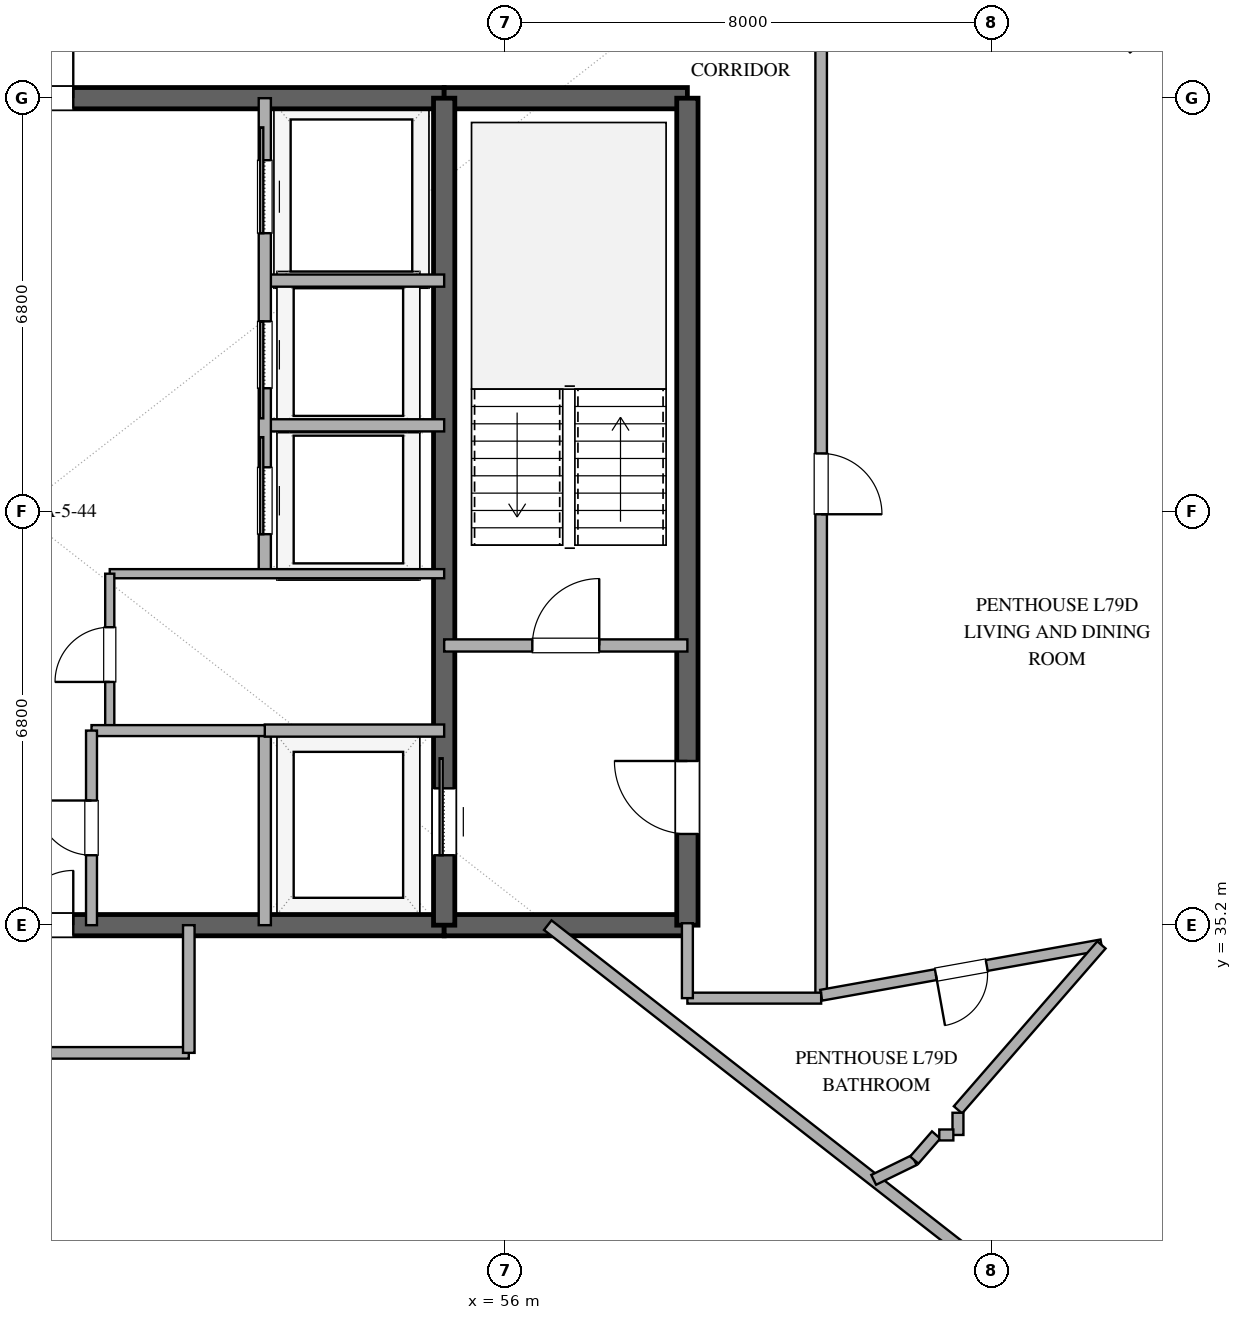
"""IFC4 building model, lengths in metres.
Left out: names, types, materials, properties, quantities, classifications, styles, units other than length and angle.
Written with IfcOpenShell. Run it as: python <this file> out.ifc"""

import sys

from ifc_helpers import new_model, si_unit, direction, frame, frame_2d, origin, place, context, subcontext, project, spatial, rectangle, extrude, element, fill, save


model = new_model("IFC4")
c1 = context("Model", 3, precision=1e-05, world=origin(), true_north=direction((0.0, 1.0)))
c2 = subcontext(c1, "Body", "Model", "MODEL_VIEW")
j1 = project(units=[si_unit("LENGTHUNIT", "METRE"), si_unit("PLANEANGLEUNIT", "RADIAN")], contexts=[c1])
p1 = place(None, origin())
s1 = spatial("IfcSite", under=j1, at=p1, CompositionType="ELEMENT")
p2 = place(p1, origin())
s2 = spatial("IfcBuilding", under=s1, at=p2, CompositionType="ELEMENT")
p3 = place(p2, frame((0.0, 0.0, 305.4)))
s3 = spatial("IfcBuildingStorey", under=s2, at=p3, CompositionType="ELEMENT", Elevation=305.4)
p4 = place(p3, frame((41.0, 35.2, 0.0), z_axis=(0.0, 0.0, 1.0), x_axis=(1.0, 0.0, 0.0)))
e1 = element("IfcWall", 1, at=p4, inside=s3, PredefinedType="SHEAR", context=c2, shape_type="SweptSolid", body=[
    extrude(rectangle(XDim=14.0, YDim=0.35, at=frame_2d((7.0, 0.0))), origin(), (0.0, 0.0, 1.0), 3.37),
])
p5 = place(p4, frame((6.1, 0.0, 0.0)))
e2 = element("IfcOpeningElement", 2, at=p5, cuts=e1, PredefinedType="OPENING", context=c2, shape_type="SweptSolid", body=[
    extrude(rectangle(XDim=1.8, YDim=2.25, at=frame_2d((0.9, 1.125))), frame((0.0, 0.185, 0.0), z_axis=(0.0, -1.0, 0.0), x_axis=(1.0, 0.0, 0.0)), (0.0, 0.0, 1.0), 0.37),
])
p6 = place(p3, frame((55.0, 35.2, 0.0), z_axis=(0.0, 0.0, 1.0), x_axis=(1.0, 0.0, 0.0)))
e3 = element("IfcWall", 3, at=p6, inside=s3, PredefinedType="SHEAR", context=c2, shape_type="SweptSolid", body=[
    extrude(rectangle(XDim=4.0, YDim=0.35, at=frame_2d((2.0, 0.0))), origin(), (0.0, 0.0, 1.0), 3.37),
])
p7 = place(p3, frame((41.0, 48.8, 0.0), z_axis=(0.0, 0.0, 1.0), x_axis=(1.0, 0.0, 0.0)))
e4 = element("IfcWall", 4, at=p7, inside=s3, PredefinedType="SHEAR", context=c2, shape_type="SweptSolid", body=[
    extrude(rectangle(XDim=14.0, YDim=0.35, at=frame_2d((7.0, 0.0))), origin(), (0.0, 0.0, 1.0), 3.37),
])
p8 = place(p7, frame((6.1, 0.0, 0.0)))
e5 = element("IfcOpeningElement", 5, at=p8, cuts=e4, PredefinedType="OPENING", context=c2, shape_type="SweptSolid", body=[
    extrude(rectangle(XDim=1.8, YDim=2.25, at=frame_2d((0.9, 1.125))), frame((0.0, 0.185, 0.0), z_axis=(0.0, -1.0, 0.0), x_axis=(1.0, 0.0, 0.0)), (0.0, 0.0, 1.0), 0.37),
])
p9 = place(p3, frame((55.0, 48.8, 0.0), z_axis=(0.0, 0.0, 1.0), x_axis=(1.0, 0.0, 0.0)))
e6 = element("IfcWall", 6, at=p9, inside=s3, PredefinedType="SHEAR", context=c2, shape_type="SweptSolid", body=[
    extrude(rectangle(XDim=4.0, YDim=0.35, at=frame_2d((2.0, 0.0))), origin(), (0.0, 0.0, 1.0), 3.37),
])
p10 = place(p3, frame((59.0, 35.2, 0.0), z_axis=(0.0, 0.0, 1.0), x_axis=(0.0, 1.0, 0.0)))
e7 = element("IfcWall", 7, at=p10, inside=s3, PredefinedType="SHEAR", context=c2, shape_type="SweptSolid", body=[
    extrude(rectangle(XDim=13.6, YDim=0.35, at=frame_2d((6.8, 0.0))), origin(), (0.0, 0.0, 1.0), 3.37),
])
p11 = place(p10, frame((1.5, 0.0, 0.0)))
e8 = element("IfcOpeningElement", 8, at=p11, cuts=e7, PredefinedType="OPENING", context=c2, shape_type="SweptSolid", body=[
    extrude(rectangle(XDim=1.2, YDim=2.15, at=frame_2d((0.6, 1.075))), frame((0.0, 0.185, 0.0), z_axis=(0.0, -1.0, 0.0), x_axis=(1.0, 0.0, 0.0)), (0.0, 0.0, 1.0), 0.37),
])
p12 = place(p3, frame((55.0, 35.2, 0.0), z_axis=(0.0, 0.0, 1.0), x_axis=(0.0, 1.0, 0.0)))
e9 = element("IfcWall", 9, at=p12, inside=s3, PredefinedType="SHEAR", context=c2, shape_type="SweptSolid", body=[
    extrude(rectangle(XDim=13.6, YDim=0.35, at=frame_2d((6.8, 0.0))), origin(), (0.0, 0.0, 1.0), 3.37),
])
p13 = place(p12, frame((1.15, 0.0, 0.0)))
e10 = element("IfcOpeningElement", 10, at=p13, cuts=e9, PredefinedType="OPENING", context=c2, shape_type="SweptSolid", body=[
    extrude(rectangle(XDim=1.1, YDim=2.2, at=frame_2d((0.55, 1.1))), frame((0.0, 0.185, 0.0), z_axis=(0.0, -1.0, 0.0), x_axis=(1.0, 0.0, 0.0)), (0.0, 0.0, 1.0), 0.37),
])
p14 = place(p3, frame((66.383, 28.013, 0.0), z_axis=(0.0, 0.0, 1.0), x_axis=(0.63761509934, 0.770355103243, 0.0)))
e11 = element("IfcWall", 11, at=p14, inside=s3, PredefinedType="SOLIDWALL", context=c2, shape_type="SweptSolid", body=[
    extrude(rectangle(XDim=8.33, YDim=0.28, at=frame_2d((4.165, 0.0))), origin(), (0.0, 0.0, 1.0), 3.37),
])
p15 = place(p14, frame((2.426, 0.0, 0.85)))
e12 = element("IfcOpeningElement", 12, at=p15, cuts=e11, PredefinedType="OPENING", context=c2, shape_type="SweptSolid", body=[
    extrude(rectangle(XDim=1.2, YDim=1.8, at=frame_2d((0.6, 0.9))), frame((0.0, 0.15, 0.0), z_axis=(0.0, -1.0, 0.0), x_axis=(1.0, 0.0, 0.0)), (0.0, 0.0, 1.0), 0.3),
])
p16 = place(p14, frame((4.596, 0.0, 0.85)))
e13 = element("IfcOpeningElement", 13, at=p16, cuts=e11, PredefinedType="OPENING", context=c2, shape_type="SweptSolid", body=[
    extrude(rectangle(XDim=1.2, YDim=1.8, at=frame_2d((0.6, 0.9))), frame((0.0, 0.15, 0.0), z_axis=(0.0, -1.0, 0.0), x_axis=(1.0, 0.0, 0.0)), (0.0, 0.0, 1.0), 0.3),
])
p17 = place(p3, frame((55.0, 39.8, 0.0), z_axis=(0.0, 0.0, 1.0), x_axis=(1.0, 0.0, 0.0)))
e14 = element("IfcWall", 14, at=p17, inside=s3, PredefinedType="SOLIDWALL", context=c2, shape_type="SweptSolid", body=[
    extrude(rectangle(XDim=4.0, YDim=0.2, at=frame_2d((2.0, 0.0))), origin(), (0.0, 0.0, 1.0), 2.73),
])
p18 = place(p17, frame((1.45, 0.0, 0.0)))
e15 = element("IfcOpeningElement", 15, at=p18, cuts=e14, PredefinedType="OPENING", context=c2, shape_type="SweptSolid", body=[
    extrude(rectangle(XDim=1.1, YDim=2.15, at=frame_2d((0.55, 1.075))), frame((0.0, 0.11, 0.0), z_axis=(0.0, -1.0, 0.0), x_axis=(1.0, 0.0, 0.0)), (0.0, 0.0, 1.0), 0.22),
])
p19 = place(p3, frame((52.05, 35.2, 0.0), z_axis=(0.0, 0.0, 1.0), x_axis=(0.0, 1.0, 0.0)))
e16 = element("IfcWall", 16, at=p19, inside=s3, PredefinedType="SOLIDWALL", context=c2, shape_type="SweptSolid", body=[
    extrude(rectangle(XDim=3.2, YDim=0.2, at=frame_2d((1.6, 0.0))), origin(), (0.0, 0.0, 1.0), 2.73),
])
for number, where, z_axis, x_axis in (
    (17, (52.05, 38.4, 0.0), (0.0, 0.0, 1.0), (1.0, 0.0, 0.0)),
    (18, (52.05, 43.42, 0.0), (0.0, 0.0, 1.0), (1.0, 0.0, 0.0)),
    (19, (52.05, 45.8, 0.0), (0.0, 0.0, 1.0), (1.0, 0.0, 0.0)),
):
    element("IfcWall", number, at=place(p3, frame(where, z_axis=z_axis, x_axis=x_axis)), inside=s3, PredefinedType="SOLIDWALL", context=c2, shape_type="SweptSolid", body=[
        extrude(rectangle(XDim=2.95, YDim=0.2, at=frame_2d((1.475, 0.0))), origin(), (0.0, 0.0, 1.0), 2.73),
    ])
p20 = place(p3, frame((52.05, 40.98, 0.0), z_axis=(0.0, 0.0, 1.0), x_axis=(0.0, 1.0, 0.0)))
e20 = element("IfcWall", 20, at=p20, inside=s3, PredefinedType="SOLIDWALL", context=c2, shape_type="SweptSolid", body=[
    extrude(rectangle(XDim=7.82, YDim=0.2, at=frame_2d((3.91, 0.0))), origin(), (0.0, 0.0, 1.0), 2.73),
])
p21 = place(p20, frame((0.65, 0.0, 0.0)))
e21 = element("IfcOpeningElement", 21, at=p21, cuts=e20, PredefinedType="OPENING", context=c2, shape_type="SweptSolid", body=[
    extrude(rectangle(XDim=1.1, YDim=2.2, at=frame_2d((0.55, 1.1))), frame((0.0, 0.11, 0.0), z_axis=(0.0, -1.0, 0.0), x_axis=(1.0, 0.0, 0.0)), (0.0, 0.0, 1.0), 0.22),
])
p22 = place(p20, frame((3.05, 0.0, 0.0)))
e22 = element("IfcOpeningElement", 22, at=p22, cuts=e20, PredefinedType="OPENING", context=c2, shape_type="SweptSolid", body=[
    extrude(rectangle(XDim=1.1, YDim=2.2, at=frame_2d((0.55, 1.1))), frame((0.0, 0.11, 0.0), z_axis=(0.0, -1.0, 0.0), x_axis=(1.0, 0.0, 0.0)), (0.0, 0.0, 1.0), 0.22),
])
p23 = place(p20, frame((5.6, 0.0, 0.0)))
e23 = element("IfcOpeningElement", 23, at=p23, cuts=e20, PredefinedType="OPENING", context=c2, shape_type="SweptSolid", body=[
    extrude(rectangle(XDim=1.2, YDim=2.2, at=frame_2d((0.6, 1.1))), frame((0.0, 0.11, 0.0), z_axis=(0.0, -1.0, 0.0), x_axis=(1.0, 0.0, 0.0)), (0.0, 0.0, 1.0), 0.22),
])
p24 = place(p3, frame((49.5, 40.98, 0.0), z_axis=(0.0, 0.0, 1.0), x_axis=(1.0, 0.0, 0.0)))
e24 = element("IfcWall", 24, at=p24, inside=s3, PredefinedType="PARTITIONING", context=c2, shape_type="SweptSolid", body=[
    extrude(rectangle(XDim=5.5, YDim=0.15, at=frame_2d((2.75, 0.0))), origin(), (0.0, 0.0, 1.0), 2.73),
])
p25 = place(p3, frame((49.5, 38.4, 0.0), z_axis=(0.0, 0.0, 1.0), x_axis=(0.0, 1.0, 0.0)))
e25 = element("IfcWall", 25, at=p25, inside=s3, PredefinedType="PARTITIONING", context=c2, shape_type="SweptSolid", body=[
    extrude(rectangle(XDim=2.58, YDim=0.15, at=frame_2d((1.29, 0.0))), origin(), (0.0, 0.0, 1.0), 2.73),
])
p26 = place(p25, frame((0.8, 0.0, 0.0)))
e26 = element("IfcOpeningElement", 26, at=p26, cuts=e25, PredefinedType="OPENING", context=c2, shape_type="SweptSolid", body=[
    extrude(rectangle(XDim=0.9, YDim=2.15, at=frame_2d((0.45, 1.075))), frame((0.0, 0.085, 0.0), z_axis=(0.0, -1.0, 0.0), x_axis=(1.0, 0.0, 0.0)), (0.0, 0.0, 1.0), 0.17),
])
p27 = place(p3, frame((49.2, 38.4, 0.0), z_axis=(0.0, 0.0, 1.0), x_axis=(1.0, 0.0, 0.0)))
e27 = element("IfcWall", 27, at=p27, inside=s3, PredefinedType="PLUMBINGWALL", context=c2, shape_type="SweptSolid", body=[
    extrude(rectangle(XDim=2.85, YDim=0.18, at=frame_2d((1.425, 0.0))), origin(), (0.0, 0.0, 1.0), 2.73),
])
p28 = place(p3, frame((49.2, 35.2, 0.0), z_axis=(0.0, 0.0, 1.0), x_axis=(0.0, 1.0, 0.0)))
e28 = element("IfcWall", 28, at=p28, inside=s3, PredefinedType="PLUMBINGWALL", context=c2, shape_type="SweptSolid", body=[
    extrude(rectangle(XDim=3.2, YDim=0.18, at=frame_2d((1.6, 0.0))), origin(), (0.0, 0.0, 1.0), 2.73),
])
p29 = place(p28, frame((1.15, 0.0, 0.0)))
e29 = element("IfcOpeningElement", 29, at=p29, cuts=e28, PredefinedType="OPENING", context=c2, shape_type="SweptSolid", body=[
    extrude(rectangle(XDim=0.9, YDim=2.1, at=frame_2d((0.45, 1.05))), frame((0.0, 0.1, 0.0), z_axis=(0.0, -1.0, 0.0), x_axis=(1.0, 0.0, 0.0)), (0.0, 0.0, 1.0), 0.2),
])
p30 = place(p3, frame((61.2, 50.9, 0.0), z_axis=(0.0, 0.0, 1.0), x_axis=(0.0, -1.0, 0.0)))
e30 = element("IfcWall", 30, at=p30, inside=s3, PredefinedType="PARTITIONING", context=c2, shape_type="SweptSolid", body=[
    extrude(rectangle(XDim=16.885, YDim=0.19, at=frame_2d((8.442, 0.0))), origin(), (0.0, 0.0, 1.0), 2.73),
])
p31 = place(p30, frame((7.942, 0.0, 0.0)))
e31 = element("IfcOpeningElement", 31, at=p31, cuts=e30, PredefinedType="OPENING", context=c2, shape_type="SweptSolid", body=[
    extrude(rectangle(XDim=1.0, YDim=2.2, at=frame_2d((0.5, 1.1))), frame((0.0, 0.105, 0.0), z_axis=(0.0, -1.0, 0.0), x_axis=(1.0, 0.0, 0.0)), (0.0, 0.0, 1.0), 0.21),
])
p32 = place(p3, frame((56.704, 35.2, 0.0), z_axis=(0.0, 0.0, 1.0), x_axis=(0.78802314347, -0.615645616695, 0.0)))
e32 = element("IfcWall", 32, at=p32, inside=s3, PredefinedType="PARTITIONING", context=c2, shape_type="SweptSolid", body=[
    extrude(rectangle(XDim=12.034, YDim=0.2, at=frame_2d((6.017, 0.0))), origin(), (0.0, 0.0, 1.0), 2.73),
])
p33 = place(p3, frame((50.8, 33.1, 0.0), z_axis=(0.0, 0.0, 1.0), x_axis=(-1.0, 0.0, 0.0)))
e33 = element("IfcWall", 33, at=p33, inside=s3, PredefinedType="PARTITIONING", context=c2, shape_type="SweptSolid", body=[
    extrude(rectangle(XDim=5.6, YDim=0.19, at=frame_2d((2.8, 0.0))), origin(), (0.0, 0.0, 1.0), 2.73),
])
p34 = place(p33, frame((2.3, 0.0, 0.0)))
e34 = element("IfcOpeningElement", 34, at=p34, cuts=e33, PredefinedType="OPENING", context=c2, shape_type="SweptSolid", body=[
    extrude(rectangle(XDim=1.0, YDim=2.2, at=frame_2d((0.5, 1.1))), frame((0.0, 0.105, 0.0), z_axis=(0.0, -1.0, 0.0), x_axis=(1.0, 0.0, 0.0)), (0.0, 0.0, 1.0), 0.21),
])
p35 = place(p3, frame((68.481, 48.345, 0.0), z_axis=(0.0, 0.0, 1.0), x_axis=(-0.649208179997, 0.760610767097, 0.0)))
e35 = element("IfcWall", 35, at=p35, inside=s3, PredefinedType="PARTITIONING", context=c2, shape_type="SweptSolid", body=[
    extrude(rectangle(XDim=5.593, YDim=0.15, at=frame_2d((2.796, 0.0))), origin(), (0.0, 0.0, 1.0), 2.73),
])
p36 = place(p35, frame((2.346, 0.0, 0.0)))
e36 = element("IfcOpeningElement", 36, at=p36, cuts=e35, PredefinedType="OPENING", context=c2, shape_type="SweptSolid", body=[
    extrude(rectangle(XDim=0.9, YDim=2.1, at=frame_2d((0.45, 1.05))), frame((0.0, 0.085, 0.0), z_axis=(0.0, -1.0, 0.0), x_axis=(1.0, 0.0, 0.0)), (0.0, 0.0, 1.0), 0.17),
])
p37 = place(p3, frame((65.81, 34.875, 0.0), z_axis=(0.0, 0.0, 1.0), x_axis=(-0.984255399889, -0.1767521083, 0.0)))
e37 = element("IfcWall", 37, at=p37, inside=s3, PredefinedType="PLUMBINGWALL", context=c2, shape_type="SweptSolid", body=[
    extrude(rectangle(XDim=4.684, YDim=0.18, at=frame_2d((2.342, 0.0))), origin(), (0.0, 0.0, 1.0), 2.73),
])
p38 = place(p37, frame((1.917, 0.0, 0.0)))
e38 = element("IfcOpeningElement", 38, at=p38, cuts=e37, PredefinedType="OPENING", context=c2, shape_type="SweptSolid", body=[
    extrude(rectangle(XDim=0.85, YDim=2.1, at=frame_2d((0.425, 1.05))), frame((0.0, 0.1, 0.0), z_axis=(0.0, -1.0, 0.0), x_axis=(1.0, 0.0, 0.0)), (0.0, 0.0, 1.0), 0.2),
])
p39 = place(p3, frame((63.45, 32.163, 0.0), z_axis=(0.0, 0.0, 1.0), x_axis=(0.656415720833, 0.754399364689, 0.0)))
e39 = element("IfcWall", 39, at=p39, inside=s3, PredefinedType="PLUMBINGWALL", context=c2, shape_type="SweptSolid", body=[
    extrude(rectangle(XDim=3.595, YDim=0.18, at=frame_2d((1.798, 0.0))), origin(), (0.0, 0.0, 1.0), 2.73),
])
p40 = place(p3, frame((61.2, 34.0, 0.0), z_axis=(0.0, 0.0, 1.0), x_axis=(-1.0, 0.0, 0.0)))
e40 = element("IfcWall", 40, at=p40, inside=s3, PredefinedType="PLUMBINGWALL", context=c2, shape_type="SweptSolid", body=[
    extrude(rectangle(XDim=2.2, YDim=0.18, at=frame_2d((1.1, 0.0))), origin(), (0.0, 0.0, 1.0), 2.73),
])
p41 = place(p3, frame((50.8, 35.2, 0.0), z_axis=(0.0, 0.0, 1.0), x_axis=(0.0, -1.0, 0.0)))
e41 = element("IfcWall", 41, at=p41, inside=s3, PredefinedType="PARTITIONING", context=c2, shape_type="SweptSolid", body=[
    extrude(rectangle(XDim=2.1, YDim=0.19, at=frame_2d((1.05, 0.0))), origin(), (0.0, 0.0, 1.0), 2.73),
])
p42 = place(p3, frame((59.0, 34.0, 0.0), z_axis=(0.0, 0.0, 1.0), x_axis=(0.0, 1.0, 0.0)))
e42 = element("IfcWall", 42, at=p42, inside=s3, PredefinedType="PLUMBINGWALL", context=c2, shape_type="SweptSolid", body=[
    extrude(rectangle(XDim=1.232, YDim=0.18, at=frame_2d((0.616, 0.0))), origin(), (0.0, 0.0, 1.0), 2.73),
])
p43 = place(p3, frame((62.064, 31.012, 0.0), z_axis=(0.0, 0.0, 1.0), x_axis=(0.898856964529, 0.438242121798, 0.0)))
e43 = element("IfcWall", 43, at=p43, inside=s3, PredefinedType="PLUMBINGWALL", context=c2, shape_type="SweptSolid", body=[
    extrude(rectangle(XDim=0.742, YDim=0.18, at=frame_2d((0.371, 0.0))), origin(), (0.0, 0.0, 1.0), 2.73),
])
p44 = place(p3, frame((62.731, 31.337, 0.0), z_axis=(0.0, 0.0, 1.0), x_axis=(0.656609016673, 0.754231131168, 0.0)))
e44 = element("IfcWall", 44, at=p44, inside=s3, PredefinedType="PLUMBINGWALL", context=c2, shape_type="SweptSolid", body=[
    extrude(rectangle(XDim=0.548, YDim=0.18, at=frame_2d((0.274, 0.0))), origin(), (0.0, 0.0, 1.0), 2.73),
])
p45 = place(p3, frame((63.45, 31.75, 0.0), z_axis=(0.0, 0.0, 1.0), x_axis=(0.0, 1.0, 0.0)))
e45 = element("IfcWall", 45, at=p45, inside=s3, PredefinedType="PLUMBINGWALL", context=c2, shape_type="SweptSolid", body=[
    extrude(rectangle(XDim=0.365, YDim=0.18, at=frame_2d((0.183, 0.0))), origin(), (0.0, 0.0, 1.0), 2.73),
])
p46 = place(p3, frame((63.143, 31.75, 0.0), z_axis=(0.0, 0.0, 1.0), x_axis=(1.0, 0.0, 0.0)))
e46 = element("IfcWall", 46, at=p46, inside=s3, PredefinedType="PLUMBINGWALL", context=c2, shape_type="SweptSolid", body=[
    extrude(rectangle(XDim=0.231, YDim=0.18, at=frame_2d((0.116, 0.0))), origin(), (0.0, 0.0, 1.0), 2.73),
])
p47 = place(p13, origin())
e47 = element("IfcDoor", 47, at=p47, inside=s3, OperationType="SLIDING_TO_RIGHT", PredefinedType="DOOR", context=c2, shape_type="SweptSolid", body=[
    extrude(rectangle(XDim=1.1, YDim=2.2, at=frame_2d((0.55, 1.1))), frame((0.0, 0.025, 0.0), z_axis=(0.0, -1.0, 0.0), x_axis=(1.0, 0.0, 0.0)), (0.0, 0.0, 1.0), 0.05),
])
fill(e10, e47)
p48 = place(p11, origin())
e48 = element("IfcDoor", 48, at=p48, inside=s3, OperationType="SINGLE_SWING_RIGHT", PredefinedType="DOOR", context=c2, shape_type="SweptSolid", body=[
    extrude(rectangle(XDim=1.2, YDim=2.15, at=frame_2d((0.6, 1.075))), frame((0.0, 0.025, 0.0), z_axis=(0.0, -1.0, 0.0), x_axis=(1.0, 0.0, 0.0)), (0.0, 0.0, 1.0), 0.05),
])
fill(e8, e48)
p49 = place(p5, origin())
e49 = element("IfcDoor", 49, at=p49, inside=s3, OperationType="DOUBLE_DOOR_SINGLE_SWING", PredefinedType="DOOR", context=c2, shape_type="SweptSolid", body=[
    extrude(rectangle(XDim=1.8, YDim=2.25, at=frame_2d((0.9, 1.125))), frame((0.0, 0.025, 0.0), z_axis=(0.0, -1.0, 0.0), x_axis=(1.0, 0.0, 0.0)), (0.0, 0.0, 1.0), 0.05),
])
fill(e2, e49)
p50 = place(p8, origin())
e50 = element("IfcDoor", 50, at=p50, inside=s3, OperationType="DOUBLE_DOOR_SINGLE_SWING", PredefinedType="DOOR", context=c2, shape_type="SweptSolid", body=[
    extrude(rectangle(XDim=1.8, YDim=2.25, at=frame_2d((0.9, 1.125))), frame((0.0, 0.025, 0.0), z_axis=(0.0, -1.0, 0.0), x_axis=(1.0, 0.0, 0.0)), (0.0, 0.0, 1.0), 0.05),
])
fill(e5, e50)
p51 = place(p18, origin())
e51 = element("IfcDoor", 51, at=p51, inside=s3, OperationType="SINGLE_SWING_RIGHT", PredefinedType="DOOR", context=c2, shape_type="SweptSolid", body=[
    extrude(rectangle(XDim=1.1, YDim=2.15, at=frame_2d((0.55, 1.075))), frame((0.0, 0.025, 0.0), z_axis=(0.0, -1.0, 0.0), x_axis=(1.0, 0.0, 0.0)), (0.0, 0.0, 1.0), 0.05),
])
fill(e15, e51)
p52 = place(p21, origin())
e52 = element("IfcDoor", 52, at=p52, inside=s3, OperationType="SLIDING_TO_RIGHT", PredefinedType="DOOR", context=c2, shape_type="SweptSolid", body=[
    extrude(rectangle(XDim=1.1, YDim=2.2, at=frame_2d((0.55, 1.1))), frame((0.0, 0.025, 0.0), z_axis=(0.0, -1.0, 0.0), x_axis=(1.0, 0.0, 0.0)), (0.0, 0.0, 1.0), 0.05),
])
fill(e21, e52)
p53 = place(p22, origin())
e53 = element("IfcDoor", 53, at=p53, inside=s3, OperationType="SLIDING_TO_LEFT", PredefinedType="DOOR", context=c2, shape_type="SweptSolid", body=[
    extrude(rectangle(XDim=1.1, YDim=2.2, at=frame_2d((0.55, 1.1))), frame((0.0, 0.025, 0.0), z_axis=(0.0, -1.0, 0.0), x_axis=(1.0, 0.0, 0.0)), (0.0, 0.0, 1.0), 0.05),
])
fill(e22, e53)
p54 = place(p23, origin())
e54 = element("IfcDoor", 54, at=p54, inside=s3, OperationType="SLIDING_TO_RIGHT", PredefinedType="DOOR", context=c2, shape_type="SweptSolid", body=[
    extrude(rectangle(XDim=1.2, YDim=2.2, at=frame_2d((0.6, 1.1))), frame((0.0, 0.025, 0.0), z_axis=(0.0, -1.0, 0.0), x_axis=(1.0, 0.0, 0.0)), (0.0, 0.0, 1.0), 0.05),
])
fill(e23, e54)
p55 = place(p26, origin())
e55 = element("IfcDoor", 55, at=p55, inside=s3, OperationType="SINGLE_SWING_LEFT", PredefinedType="DOOR", context=c2, shape_type="SweptSolid", body=[
    extrude(rectangle(XDim=0.9, YDim=2.15, at=frame_2d((0.45, 1.075))), frame((0.0, 0.025, 0.0), z_axis=(0.0, -1.0, 0.0), x_axis=(1.0, 0.0, 0.0)), (0.0, 0.0, 1.0), 0.05),
])
fill(e26, e55)
p56 = place(p29, origin())
e56 = element("IfcDoor", 56, at=p56, inside=s3, OperationType="SINGLE_SWING_RIGHT", PredefinedType="DOOR", context=c2, shape_type="SweptSolid", body=[
    extrude(rectangle(XDim=0.9, YDim=2.1, at=frame_2d((0.45, 1.05))), frame((0.0, 0.025, 0.0), z_axis=(0.0, -1.0, 0.0), x_axis=(1.0, 0.0, 0.0)), (0.0, 0.0, 1.0), 0.05),
])
fill(e29, e56)
p57 = place(p31, origin())
e57 = element("IfcDoor", 57, at=p57, inside=s3, OperationType="SINGLE_SWING_RIGHT", PredefinedType="DOOR", context=c2, shape_type="SweptSolid", body=[
    extrude(rectangle(XDim=1.0, YDim=2.2, at=frame_2d((0.5, 1.1))), frame((0.0, 0.025, 0.0), z_axis=(0.0, -1.0, 0.0), x_axis=(1.0, 0.0, 0.0)), (0.0, 0.0, 1.0), 0.05),
])
fill(e31, e57)
p58 = place(p38, origin())
e58 = element("IfcDoor", 58, at=p58, inside=s3, OperationType="SINGLE_SWING_RIGHT", PredefinedType="DOOR", context=c2, shape_type="SweptSolid", body=[
    extrude(rectangle(XDim=0.85, YDim=2.1, at=frame_2d((0.425, 1.05))), frame((0.0, 0.025, 0.0), z_axis=(0.0, -1.0, 0.0), x_axis=(1.0, 0.0, 0.0)), (0.0, 0.0, 1.0), 0.05),
])
fill(e38, e58)
save(model, sys.argv[1])
